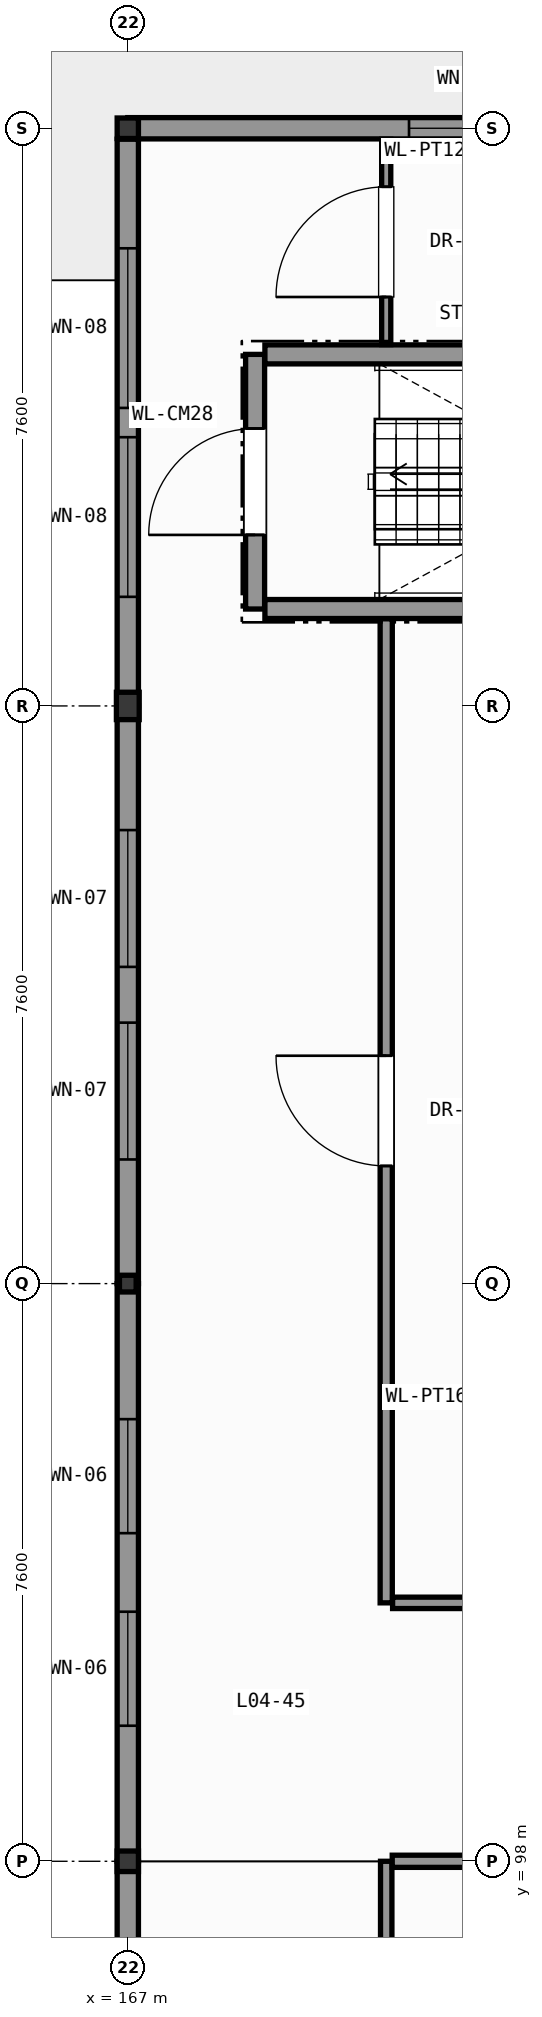
"""IFC4 building model, lengths in metres.
Left out: names, types, materials, properties, quantities, classifications, styles, units other than length and angle.
Written with IfcOpenShell. Run it as: python <this file> out.ifc"""

import sys

from ifc_helpers import new_model, si_unit, direction, frame, frame_2d, origin, origin_2d, place, context, subcontext, project, spatial, rectangle, hollow_rectangle, i_section, extrude, element, fill, save


model = new_model("IFC4")
c1 = context("Model", 3, precision=1e-05, world=origin(), true_north=direction((0.0, 1.0)))
c2 = subcontext(c1, "Body", "Model", "MODEL_VIEW")
j1 = project(units=[si_unit("LENGTHUNIT", "METRE"), si_unit("PLANEANGLEUNIT", "RADIAN")], contexts=[c1])
p1 = place(None, origin())
s1 = spatial("IfcSite", under=j1, at=p1, CompositionType="ELEMENT")
p2 = place(p1, origin())
s2 = spatial("IfcBuilding", under=s1, at=p2, CompositionType="ELEMENT")
p3 = place(p2, frame((0.0, 0.0, 18.0)))
s3 = spatial("IfcBuildingStorey", under=s2, at=p3, CompositionType="ELEMENT", Elevation=18.0)
p4 = place(p3, frame((167.0, 98.0, 0.0), z_axis=(0.0, 0.0, 1.0), x_axis=(1.0, 0.0, 0.0)))
e1 = element("IfcColumn", 1, at=p4, inside=s3, PredefinedType="COLUMN", context=c2, shape_type="SweptSolid", body=[
    extrude(i_section(OverallWidth=0.28, OverallDepth=0.27, WebThickness=0.008, FlangeThickness=0.013, FilletRadius=0.024, at=origin_2d()), origin(), (0.0, 0.0, 1.0), 4.2),
])
p5 = place(p3, frame((167.0, 105.6, 0.0), z_axis=(0.0, 0.0, 1.0), x_axis=(1.0, 0.0, 0.0)))
e2 = element("IfcColumn", 2, at=p5, inside=s3, PredefinedType="COLUMN", context=c2, shape_type="SweptSolid", body=[
    extrude(hollow_rectangle(XDim=0.22, YDim=0.22, WallThickness=0.012, InnerFilletRadius=0.012, OuterFilletRadius=0.024, at=origin_2d()), origin(), (0.0, 0.0, 1.0), 4.2),
])
p6 = place(p3, frame((167.0, 113.2, 0.0), z_axis=(0.0, 0.0, 1.0), x_axis=(1.0, 0.0, 0.0)))
e3 = element("IfcColumn", 3, at=p6, inside=s3, PredefinedType="COLUMN", context=c2, shape_type="SweptSolid", body=[
    extrude(i_section(OverallWidth=0.3, OverallDepth=0.36, WebThickness=0.012, FlangeThickness=0.022, FilletRadius=0.027, at=origin_2d()), origin(), (0.0, 0.0, 1.0), 4.2),
])
p7 = place(p3, frame((167.0, 120.8, 0.0), z_axis=(0.0, 0.0, 1.0), x_axis=(1.0, 0.0, 0.0)))
e4 = element("IfcColumn", 4, at=p7, inside=s3, PredefinedType="COLUMN", context=c2, shape_type="SweptSolid", body=[
    extrude(i_section(OverallWidth=0.28, OverallDepth=0.27, WebThickness=0.008, FlangeThickness=0.013, FilletRadius=0.024, at=origin_2d()), origin(), (0.0, 0.0, 1.0), 4.2),
])
p8 = place(p3, frame((167.0, 120.8, 0.0), z_axis=(0.0, 0.0, 1.0), x_axis=(1.0, 0.0, 0.0)))
e5 = element("IfcWall", 5, at=p8, inside=s3, PredefinedType="SOLIDWALL", context=c2, shape_type="SweptSolid", body=[
    extrude(rectangle(XDim=12.0, YDim=0.28, at=frame_2d((6.0, 0.0))), origin(), (0.0, 0.0, 1.0), 3.385),
])
p9 = place(p8, frame((3.7, 0.0, 0.95)))
e6 = element("IfcOpeningElement", 6, at=p9, cuts=e5, PredefinedType="OPENING", context=c2, shape_type="SweptSolid", body=[
    extrude(rectangle(XDim=1.5, YDim=2.04, at=frame_2d((0.75, 1.02))), frame((0.0, 0.15, 0.0), z_axis=(0.0, -1.0, 0.0), x_axis=(1.0, 0.0, 0.0)), (0.0, 0.0, 1.0), 0.3),
])
p10 = place(p8, frame((7.2, 0.0, 0.95)))
e7 = element("IfcOpeningElement", 7, at=p10, cuts=e5, PredefinedType="OPENING", context=c2, shape_type="SweptSolid", body=[
    extrude(rectangle(XDim=1.5, YDim=2.04, at=frame_2d((0.75, 1.02))), frame((0.0, 0.15, 0.0), z_axis=(0.0, -1.0, 0.0), x_axis=(1.0, 0.0, 0.0)), (0.0, 0.0, 1.0), 0.3),
])
p11 = place(p3, frame((167.0, 113.2, 0.0), z_axis=(0.0, 0.0, 1.0), x_axis=(0.0, 1.0, 0.0)))
e8 = element("IfcWall", 8, at=p11, inside=s3, PredefinedType="SOLIDWALL", context=c2, shape_type="SweptSolid", body=[
    extrude(rectangle(XDim=7.456, YDim=0.28, at=frame_2d((3.728, 0.0))), origin(), (0.0, 0.0, 1.0), 3.645),
])
p12 = place(p11, frame((1.435, 0.0, 0.95)))
e9 = element("IfcOpeningElement", 9, at=p12, cuts=e8, PredefinedType="OPENING", context=c2, shape_type="SweptSolid", body=[
    extrude(rectangle(XDim=2.1, YDim=2.29, at=frame_2d((1.05, 1.145))), frame((0.0, 0.15, 0.0), z_axis=(0.0, -1.0, 0.0), x_axis=(1.0, 0.0, 0.0)), (0.0, 0.0, 1.0), 0.3),
])
p13 = place(p11, frame((3.921, 0.0, 0.95)))
e10 = element("IfcOpeningElement", 10, at=p13, cuts=e8, PredefinedType="OPENING", context=c2, shape_type="SweptSolid", body=[
    extrude(rectangle(XDim=2.1, YDim=2.29, at=frame_2d((1.05, 1.145))), frame((0.0, 0.15, 0.0), z_axis=(0.0, -1.0, 0.0), x_axis=(1.0, 0.0, 0.0)), (0.0, 0.0, 1.0), 0.3),
])
p14 = place(p3, frame((167.0, 105.6, 0.0), z_axis=(0.0, 0.0, 1.0), x_axis=(0.0, 1.0, 0.0)))
e11 = element("IfcWall", 11, at=p14, inside=s3, PredefinedType="SOLIDWALL", context=c2, shape_type="SweptSolid", body=[
    extrude(rectangle(XDim=7.6, YDim=0.28, at=frame_2d((3.8, 0.0))), origin(), (0.0, 0.0, 1.0), 3.645),
])
p15 = place(p14, frame((1.633, 0.0, 0.95)))
e12 = element("IfcOpeningElement", 12, at=p15, cuts=e11, PredefinedType="OPENING", context=c2, shape_type="SweptSolid", body=[
    extrude(rectangle(XDim=1.8, YDim=2.29, at=frame_2d((0.9, 1.145))), frame((0.0, 0.15, 0.0), z_axis=(0.0, -1.0, 0.0), x_axis=(1.0, 0.0, 0.0)), (0.0, 0.0, 1.0), 0.3),
])
p16 = place(p14, frame((4.167, 0.0, 0.95)))
e13 = element("IfcOpeningElement", 13, at=p16, cuts=e11, PredefinedType="OPENING", context=c2, shape_type="SweptSolid", body=[
    extrude(rectangle(XDim=1.8, YDim=2.29, at=frame_2d((0.9, 1.145))), frame((0.0, 0.15, 0.0), z_axis=(0.0, -1.0, 0.0), x_axis=(1.0, 0.0, 0.0)), (0.0, 0.0, 1.0), 0.3),
])
p17 = place(p3, frame((167.0, 98.0, 0.0), z_axis=(0.0, 0.0, 1.0), x_axis=(0.0, 1.0, 0.0)))
e14 = element("IfcWall", 14, at=p17, inside=s3, PredefinedType="SOLIDWALL", context=c2, shape_type="SweptSolid", body=[
    extrude(rectangle(XDim=7.6, YDim=0.28, at=frame_2d((3.8, 0.0))), origin(), (0.0, 0.0, 1.0), 3.645),
])
p18 = place(p17, frame((1.783, 0.0, 0.95)))
e15 = element("IfcOpeningElement", 15, at=p18, cuts=e14, PredefinedType="OPENING", context=c2, shape_type="SweptSolid", body=[
    extrude(rectangle(XDim=1.5, YDim=2.29, at=frame_2d((0.75, 1.145))), frame((0.0, 0.15, 0.0), z_axis=(0.0, -1.0, 0.0), x_axis=(1.0, 0.0, 0.0)), (0.0, 0.0, 1.0), 0.3),
])
p19 = place(p17, frame((4.317, 0.0, 0.95)))
e16 = element("IfcOpeningElement", 16, at=p19, cuts=e14, PredefinedType="OPENING", context=c2, shape_type="SweptSolid", body=[
    extrude(rectangle(XDim=1.5, YDim=2.29, at=frame_2d((0.75, 1.145))), frame((0.0, 0.15, 0.0), z_axis=(0.0, -1.0, 0.0), x_axis=(1.0, 0.0, 0.0)), (0.0, 0.0, 1.0), 0.3),
])
p20 = place(p3, frame((167.0, 90.4, 0.0), z_axis=(0.0, 0.0, 1.0), x_axis=(0.0, 1.0, 0.0)))
e17 = element("IfcWall", 17, at=p20, inside=s3, PredefinedType="SOLIDWALL", context=c2, shape_type="SweptSolid", body=[
    extrude(rectangle(XDim=7.6, YDim=0.28, at=frame_2d((3.8, 0.0))), origin(), (0.0, 0.0, 1.0), 3.645),
])
p21 = place(p20, frame((1.483, 0.0, 0.95)))
e18 = element("IfcOpeningElement", 18, at=p21, cuts=e17, PredefinedType="OPENING", context=c2, shape_type="SweptSolid", body=[
    extrude(rectangle(XDim=2.1, YDim=2.29, at=frame_2d((1.05, 1.145))), frame((0.0, 0.15, 0.0), z_axis=(0.0, -1.0, 0.0), x_axis=(1.0, 0.0, 0.0)), (0.0, 0.0, 1.0), 0.3),
])
p22 = place(p20, frame((4.017, 0.0, 0.95)))
e19 = element("IfcOpeningElement", 19, at=p22, cuts=e17, PredefinedType="OPENING", context=c2, shape_type="SweptSolid", body=[
    extrude(rectangle(XDim=2.1, YDim=2.29, at=frame_2d((1.05, 1.145))), frame((0.0, 0.15, 0.0), z_axis=(0.0, -1.0, 0.0), x_axis=(1.0, 0.0, 0.0)), (0.0, 0.0, 1.0), 0.3),
])
p23 = place(p3, frame((168.675, 114.475, 0.0), z_axis=(0.0, 0.0, 1.0), x_axis=(0.0, 1.0, 0.0)))
e20 = element("IfcWall", 20, at=p23, inside=s3, PredefinedType="SHEAR", context=c2, shape_type="SweptSolid", body=[
    extrude(rectangle(XDim=3.35, YDim=0.25, at=frame_2d((1.675, 0.0))), origin(), (0.0, 0.0, 1.0), 3.98),
])
p24 = place(p23, frame((0.975, 0.0, 0.0)))
e21 = element("IfcOpeningElement", 21, at=p24, cuts=e20, PredefinedType="OPENING", context=c2, shape_type="SweptSolid", body=[
    extrude(rectangle(XDim=1.4, YDim=2.2, at=frame_2d((0.7, 1.1))), frame((0.0, 0.135, 0.0), z_axis=(0.0, -1.0, 0.0), x_axis=(1.0, 0.0, 0.0)), (0.0, 0.0, 1.0), 0.27),
])
for number, where, z_axis, x_axis in (
    (22, (168.804, 114.475, 0.0), (0.0, 0.0, 1.0), (1.0, 0.0, 0.0)),
    (23, (168.804, 117.825, 0.0), (0.0, 0.0, 1.0), (1.0, 0.0, 0.0)),
):
    element("IfcWall", number, at=place(p3, frame(where, z_axis=z_axis, x_axis=x_axis)), inside=s3, PredefinedType="SHEAR", context=c2, shape_type="SweptSolid", body=[
        extrude(rectangle(XDim=7.192, YDim=0.25, at=frame_2d((3.596, 0.0))), origin(), (0.0, 0.0, 1.0), 3.98),
    ])
p25 = place(p3, frame((170.4, 86.884, 0.0), z_axis=(0.0, 0.0, 1.0), x_axis=(0.0, 1.0, 0.0)))
e24 = element("IfcWall", 24, at=p25, inside=s3, PredefinedType="PARTITIONING", context=c2, shape_type="SweptSolid", body=[
    extrude(rectangle(XDim=11.116, YDim=0.15, at=frame_2d((5.558, 0.0))), origin(), (0.0, 0.0, 1.0), 3.98),
])
p26 = place(p25, frame((5.033, 0.0, 0.0)))
e25 = element("IfcOpeningElement", 25, at=p26, cuts=e24, PredefinedType="OPENING", context=c2, shape_type="SweptSolid", body=[
    extrude(rectangle(XDim=1.05, YDim=2.2, at=frame_2d((0.525, 1.1))), frame((0.0, 0.085, 0.0), z_axis=(0.0, -1.0, 0.0), x_axis=(1.0, 0.0, 0.0)), (0.0, 0.0, 1.0), 0.17),
])
p27 = place(p3, frame((170.479, 98.0, 0.0), z_axis=(0.0, 0.0, 1.0), x_axis=(1.0, 0.0, 0.0)))
e26 = element("IfcWall", 26, at=p27, inside=s3, PredefinedType="PARTITIONING", context=c2, shape_type="SweptSolid", body=[
    extrude(rectangle(XDim=12.521, YDim=0.16, at=frame_2d((6.26, 0.0))), origin(), (0.0, 0.0, 1.0), 3.385),
])
p28 = place(p27, frame((5.785, 0.0, 0.0)))
e27 = element("IfcOpeningElement", 27, at=p28, cuts=e26, PredefinedType="OPENING", context=c2, shape_type="SweptSolid", body=[
    extrude(rectangle(XDim=0.95, YDim=2.1, at=frame_2d((0.475, 1.05))), frame((0.0, 0.09, 0.0), z_axis=(0.0, -1.0, 0.0), x_axis=(1.0, 0.0, 0.0)), (0.0, 0.0, 1.0), 0.18),
])
p29 = place(p3, frame((170.4, 117.954, 0.0), z_axis=(0.0, 0.0, 1.0), x_axis=(0.0, 1.0, 0.0)))
e28 = element("IfcWall", 28, at=p29, inside=s3, PredefinedType="PARTITIONING", context=c2, shape_type="SweptSolid", body=[
    extrude(rectangle(XDim=2.702, YDim=0.12, at=frame_2d((1.351, 0.0))), origin(), (0.0, 0.0, 1.0), 3.98),
])
p30 = place(p29, frame((0.626, 0.0, 0.0)))
e29 = element("IfcOpeningElement", 29, at=p30, cuts=e28, PredefinedType="OPENING", context=c2, shape_type="SweptSolid", body=[
    extrude(rectangle(XDim=1.45, YDim=2.35, at=frame_2d((0.725, 1.175))), frame((0.0, 0.07, 0.0), z_axis=(0.0, -1.0, 0.0), x_axis=(1.0, 0.0, 0.0)), (0.0, 0.0, 1.0), 0.14),
])
p31 = place(p3, frame((170.4, 101.4, 0.0), z_axis=(0.0, 0.0, 1.0), x_axis=(0.0, 1.0, 0.0)))
e30 = element("IfcWall", 30, at=p31, inside=s3, PredefinedType="PARTITIONING", context=c2, shape_type="SweptSolid", body=[
    extrude(rectangle(XDim=12.946, YDim=0.16, at=frame_2d((6.473, 0.0))), origin(), (0.0, 0.0, 1.0), 3.98),
])
p32 = place(p31, frame((5.748, 0.0, 0.0)))
e31 = element("IfcOpeningElement", 31, at=p32, cuts=e30, PredefinedType="OPENING", context=c2, shape_type="SweptSolid", body=[
    extrude(rectangle(XDim=1.45, YDim=2.35, at=frame_2d((0.725, 1.175))), frame((0.0, 0.09, 0.0), z_axis=(0.0, -1.0, 0.0), x_axis=(1.0, 0.0, 0.0)), (0.0, 0.0, 1.0), 0.18),
])
p33 = place(p3, frame((170.484, 101.4, 0.0), z_axis=(0.0, 0.0, 1.0), x_axis=(1.0, 0.0, 0.0)))
e32 = element("IfcWall", 32, at=p33, inside=s3, PredefinedType="PARTITIONING", context=c2, shape_type="SweptSolid", body=[
    extrude(rectangle(XDim=12.516, YDim=0.15, at=frame_2d((6.258, 0.0))), origin(), (0.0, 0.0, 1.0), 3.98),
])
p34 = place(p33, frame((5.533, 0.0, 0.0)))
e33 = element("IfcOpeningElement", 33, at=p34, cuts=e32, PredefinedType="OPENING", context=c2, shape_type="SweptSolid", body=[
    extrude(rectangle(XDim=1.45, YDim=2.35, at=frame_2d((0.725, 1.175))), frame((0.0, 0.085, 0.0), z_axis=(0.0, -1.0, 0.0), x_axis=(1.0, 0.0, 0.0)), (0.0, 0.0, 1.0), 0.17),
])
p35 = place(p9, origin())
e34 = element("IfcWindow", 34, at=p35, inside=s3, PartitioningType="SINGLE_PANEL", PredefinedType="WINDOW", context=c2, shape_type="SweptSolid", body=[
    extrude(rectangle(XDim=1.5, YDim=2.04, at=frame_2d((0.75, 1.02))), frame((0.0, 0.03, 0.0), z_axis=(0.0, -1.0, 0.0), x_axis=(1.0, 0.0, 0.0)), (0.0, 0.0, 1.0), 0.06),
])
fill(e6, e34)
p36 = place(p12, origin())
e35 = element("IfcWindow", 35, at=p36, inside=s3, PartitioningType="SINGLE_PANEL", PredefinedType="WINDOW", context=c2, shape_type="SweptSolid", body=[
    extrude(rectangle(XDim=2.1, YDim=2.29, at=frame_2d((1.05, 1.145))), frame((0.0, 0.03, 0.0), z_axis=(0.0, -1.0, 0.0), x_axis=(1.0, 0.0, 0.0)), (0.0, 0.0, 1.0), 0.06),
])
fill(e9, e35)
p37 = place(p13, origin())
e36 = element("IfcWindow", 36, at=p37, inside=s3, PartitioningType="SINGLE_PANEL", PredefinedType="WINDOW", context=c2, shape_type="SweptSolid", body=[
    extrude(rectangle(XDim=2.1, YDim=2.29, at=frame_2d((1.05, 1.145))), frame((0.0, 0.03, 0.0), z_axis=(0.0, -1.0, 0.0), x_axis=(1.0, 0.0, 0.0)), (0.0, 0.0, 1.0), 0.06),
])
fill(e10, e36)
p38 = place(p15, origin())
e37 = element("IfcWindow", 37, at=p38, inside=s3, PartitioningType="SINGLE_PANEL", PredefinedType="WINDOW", context=c2, shape_type="SweptSolid", body=[
    extrude(rectangle(XDim=1.8, YDim=2.29, at=frame_2d((0.9, 1.145))), frame((0.0, 0.03, 0.0), z_axis=(0.0, -1.0, 0.0), x_axis=(1.0, 0.0, 0.0)), (0.0, 0.0, 1.0), 0.06),
])
fill(e12, e37)
p39 = place(p16, origin())
e38 = element("IfcWindow", 38, at=p39, inside=s3, PartitioningType="SINGLE_PANEL", PredefinedType="WINDOW", context=c2, shape_type="SweptSolid", body=[
    extrude(rectangle(XDim=1.8, YDim=2.29, at=frame_2d((0.9, 1.145))), frame((0.0, 0.03, 0.0), z_axis=(0.0, -1.0, 0.0), x_axis=(1.0, 0.0, 0.0)), (0.0, 0.0, 1.0), 0.06),
])
fill(e13, e38)
p40 = place(p18, origin())
e39 = element("IfcWindow", 39, at=p40, inside=s3, PartitioningType="SINGLE_PANEL", PredefinedType="WINDOW", context=c2, shape_type="SweptSolid", body=[
    extrude(rectangle(XDim=1.5, YDim=2.29, at=frame_2d((0.75, 1.145))), frame((0.0, 0.03, 0.0), z_axis=(0.0, -1.0, 0.0), x_axis=(1.0, 0.0, 0.0)), (0.0, 0.0, 1.0), 0.06),
])
fill(e15, e39)
p41 = place(p19, origin())
e40 = element("IfcWindow", 40, at=p41, inside=s3, PartitioningType="SINGLE_PANEL", PredefinedType="WINDOW", context=c2, shape_type="SweptSolid", body=[
    extrude(rectangle(XDim=1.5, YDim=2.29, at=frame_2d((0.75, 1.145))), frame((0.0, 0.03, 0.0), z_axis=(0.0, -1.0, 0.0), x_axis=(1.0, 0.0, 0.0)), (0.0, 0.0, 1.0), 0.06),
])
fill(e16, e40)
p42 = place(p24, origin())
e41 = element("IfcDoor", 41, at=p42, inside=s3, OperationType="SINGLE_SWING_LEFT", PredefinedType="DOOR", context=c2, shape_type="SweptSolid", body=[
    extrude(rectangle(XDim=1.4, YDim=2.2, at=frame_2d((0.7, 1.1))), frame((0.0, 0.025, 0.0), z_axis=(0.0, -1.0, 0.0), x_axis=(1.0, 0.0, 0.0)), (0.0, 0.0, 1.0), 0.05),
])
fill(e21, e41)
p43 = place(p30, origin())
e42 = element("IfcDoor", 42, at=p43, inside=s3, OperationType="SINGLE_SWING_LEFT", PredefinedType="DOOR", context=c2, shape_type="SweptSolid", body=[
    extrude(rectangle(XDim=1.45, YDim=2.35, at=frame_2d((0.725, 1.175))), frame((0.0, 0.025, 0.0), z_axis=(0.0, -1.0, 0.0), x_axis=(1.0, 0.0, 0.0)), (0.0, 0.0, 1.0), 0.05),
])
fill(e29, e42)
p44 = place(p32, origin())
e43 = element("IfcDoor", 43, at=p44, inside=s3, OperationType="SINGLE_SWING_RIGHT", PredefinedType="DOOR", context=c2, shape_type="SweptSolid", body=[
    extrude(rectangle(XDim=1.45, YDim=2.35, at=frame_2d((0.725, 1.175))), frame((0.0, 0.025, 0.0), z_axis=(0.0, -1.0, 0.0), x_axis=(1.0, 0.0, 0.0)), (0.0, 0.0, 1.0), 0.05),
])
fill(e31, e43)
save(model, sys.argv[1])
